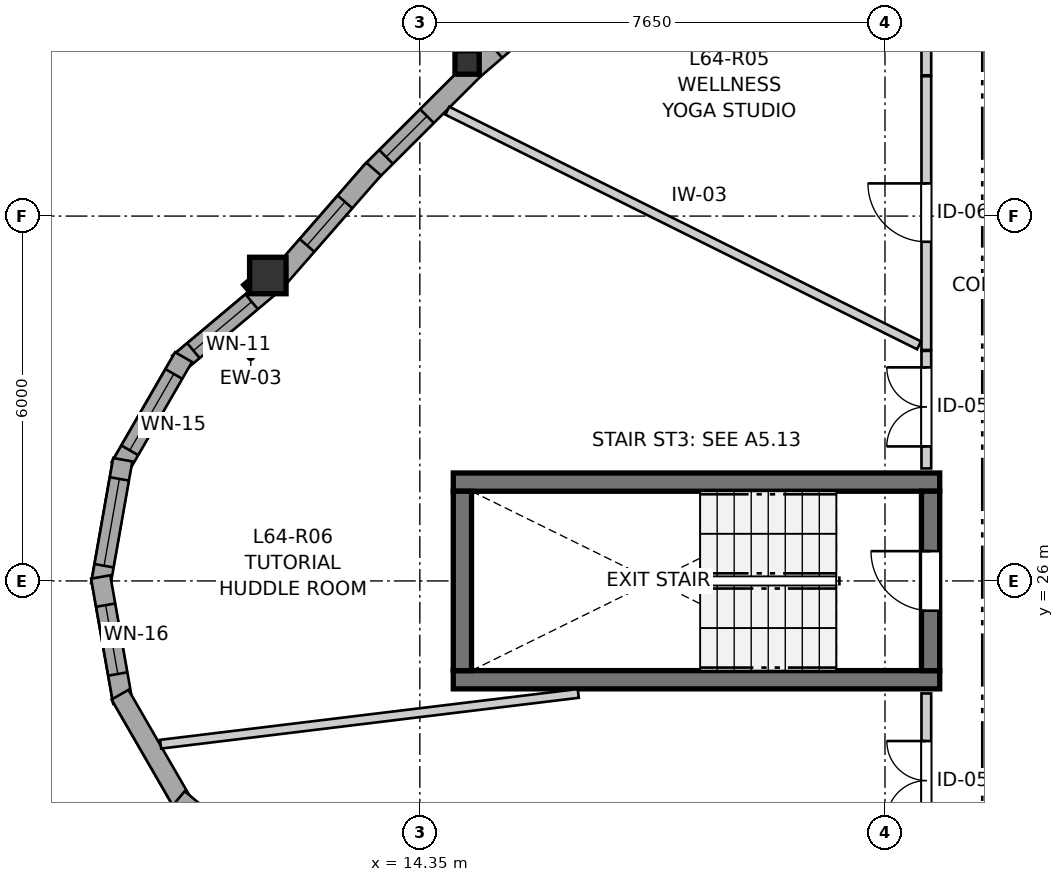
"""IFC4 building model, lengths in metres.
Left out: names, types, materials, properties, quantities, classifications, styles, units other than length and angle.
Written with IfcOpenShell. Run it as: python <this file> out.ifc"""

import sys

from ifc_helpers import new_model, si_unit, direction, frame, frame_2d, origin, origin_2d, place, context, subcontext, project, spatial, rectangle, i_section, extrude, source, transform, mapped, element, fill, save


model = new_model("IFC4")
c1 = context("Model", 3, precision=1e-05, world=origin(), true_north=direction((0.0, 1.0)))
c2 = subcontext(c1, "Body", "Model", "MODEL_VIEW")
j1 = project(units=[si_unit("LENGTHUNIT", "METRE"), si_unit("PLANEANGLEUNIT", "RADIAN")], contexts=[c1])
p1 = place(None, origin())
s1 = spatial("IfcSite", under=j1, at=p1, CompositionType="ELEMENT")
p2 = place(p1, origin())
s2 = spatial("IfcBuilding", under=s1, at=p2, CompositionType="ELEMENT")
p3 = place(p2, frame((0.0, 0.0, 214.8)))
s3 = spatial("IfcBuildingStorey", under=s2, at=p3, CompositionType="ELEMENT", Elevation=214.8)
for number, where, z_axis, x_axis in (
    (1, (14.9, 24.375, 0.0), (0.0, 0.0, 1.0), (1.0, 0.0, 0.0)),
    (2, (22.9, 27.625, 0.0), (0.0, 0.0, 1.0), (-1.0, 0.0, 0.0)),
):
    element("IfcWall", number, at=place(p3, frame(where, z_axis=z_axis, x_axis=x_axis)), inside=s3, PredefinedType="SHEAR", context=c2, shape_type="SweptSolid", body=[
        extrude(rectangle(XDim=8.0, YDim=0.3, at=frame_2d((4.0, 0.0))), origin(), (0.0, 0.0, 1.0), 2.96),
    ])
p4 = place(p3, frame((15.05, 27.475, 0.0), z_axis=(0.0, 0.0, 1.0), x_axis=(0.0, -1.0, 0.0)))
e3 = element("IfcWall", 3, at=p4, inside=s3, PredefinedType="SHEAR", context=c2, shape_type="SweptSolid", body=[
    extrude(rectangle(XDim=2.95, YDim=0.3, at=frame_2d((1.475, 0.0))), origin(), (0.0, 0.0, 1.0), 2.96),
])
p5 = place(p3, frame((22.75, 24.525, 0.0), z_axis=(0.0, 0.0, 1.0), x_axis=(0.0, 1.0, 0.0)))
e4 = element("IfcWall", 4, at=p5, inside=s3, PredefinedType="SHEAR", context=c2, shape_type="SweptSolid", body=[
    extrude(rectangle(XDim=2.95, YDim=0.3, at=frame_2d((1.475, 0.0))), origin(), (0.0, 0.0, 1.0), 2.96),
])
p6 = place(p5, frame((0.985, 0.0, 0.0)))
e5 = element("IfcOpeningElement", 5, at=p6, cuts=e4, PredefinedType="OPENING", context=c2, shape_type="SweptSolid", body=[
    extrude(rectangle(XDim=0.98, YDim=2.15, at=frame_2d((0.49, 1.075))), frame((0.0, 0.16, 0.0), z_axis=(0.0, -1.0, 0.0), x_axis=(1.0, 0.0, 0.0)), (0.0, 0.0, 1.0), 0.32),
])
m1 = source(origin(), c2, "Body", "SweptSolid", [
    extrude(rectangle(XDim=0.6, YDim=0.6, at=origin_2d()), origin(), (0.0, 0.0, 1.0), 2.96),
])
p7 = place(p3, frame((11.85, 31.023, 0.0), z_axis=(0.0, 0.0, 1.0), x_axis=(1.0, 0.0, 0.0)))
e6 = element("IfcColumn", 6, at=p7, inside=s3, PredefinedType="COLUMN", context=c2, shape_type="MappedRepresentation", body=[
    mapped(m1, transform((0.0, 0.0, 0.0), x_axis=(1.0, 0.0, 0.0), y_axis=(0.0, 1.0, 0.0), z_axis=(0.0, 0.0, 1.0), scale=1.0)),
])
m2 = source(origin(), c2, "Body", "SweptSolid", [
    extrude(i_section(OverallWidth=0.398, OverallDepth=0.387, WebThickness=0.019, FlangeThickness=0.03, FilletRadius=0.015, at=origin_2d()), origin(), (0.0, 0.0, 1.0), 2.96),
])
p8 = place(p3, frame((15.127, 34.526, 0.0), z_axis=(0.0, 0.0, 1.0), x_axis=(1.0, 0.0, 0.0)))
e7 = element("IfcColumn", 7, at=p8, inside=s3, PredefinedType="PILASTER", context=c2, shape_type="MappedRepresentation", body=[
    mapped(m2, transform((0.0, 0.0, 0.0), x_axis=(1.0, 0.0, 0.0), y_axis=(0.0, 1.0, 0.0), z_axis=(0.0, 0.0, 1.0), scale=1.0)),
])
p9 = place(p3, frame((8.912, 52.131, 0.0), z_axis=(0.0, 0.0, 1.0), x_axis=(0.500001129448, -0.866024751696, 0.0)))
e8 = element("IfcWall", 8, at=p9, inside=s3, PredefinedType="PARAPET", context=c2, shape_type="SweptSolid", body=[
    extrude(rectangle(XDim=20.349, YDim=0.26, at=frame_2d((10.175, 0.0))), origin(), (0.0, 0.0, 1.0), 0.55),
])
p10 = place(p3, frame((11.884, 30.843, 0.0), z_axis=(0.0, 0.0, 1.0), x_axis=(-0.76606505432, -0.642763045414, 0.0)))
e9 = element("IfcWall", 9, at=p10, inside=s3, PredefinedType="SOLIDWALL", context=c2, shape_type="SweptSolid", body=[
    extrude(rectangle(XDim=1.962, YDim=0.32, at=frame_2d((0.981, 0.0))), origin(), (0.0, 0.0, 1.0), 2.58),
])
p11 = place(p10, frame((0.391, 0.0, 0.82)))
e10 = element("IfcOpeningElement", 10, at=p11, cuts=e9, PredefinedType="OPENING", context=c2, shape_type="SweptSolid", body=[
    extrude(rectangle(XDim=1.25, YDim=1.35, at=frame_2d((0.625, 0.675))), frame((0.0, 0.17, 0.0), z_axis=(0.0, -1.0, 0.0), x_axis=(1.0, 0.0, 0.0)), (0.0, 0.0, 1.0), 0.34),
])
p12 = place(p3, frame((10.465, 29.681, 0.0), z_axis=(0.0, 0.0, 1.0), x_axis=(-0.499995423472, -0.866028046028, 0.0)))
e11 = element("IfcWall", 11, at=p12, inside=s3, PredefinedType="SOLIDWALL", context=c2, shape_type="SweptSolid", body=[
    extrude(rectangle(XDim=2.09, YDim=0.32, at=frame_2d((1.045, 0.0))), origin(), (0.0, 0.0, 1.0), 2.58),
])
p13 = place(p12, frame((0.32, 0.0, 0.82)))
e12 = element("IfcOpeningElement", 12, at=p13, cuts=e11, PredefinedType="OPENING", context=c2, shape_type="SweptSolid", body=[
    extrude(rectangle(XDim=1.45, YDim=1.25, at=frame_2d((0.725, 0.625))), frame((0.0, 0.17, 0.0), z_axis=(0.0, -1.0, 0.0), x_axis=(1.0, 0.0, 0.0)), (0.0, 0.0, 1.0), 0.34),
])
p14 = place(p3, frame((9.464, 27.993, 0.0), z_axis=(0.0, 0.0, 1.0), x_axis=(-0.173672066494, -0.984803540469, 0.0)))
e13 = element("IfcWall", 13, at=p14, inside=s3, PredefinedType="SOLIDWALL", context=c2, shape_type="SweptSolid", body=[
    extrude(rectangle(XDim=2.09, YDim=0.32, at=frame_2d((1.045, 0.0))), origin(), (0.0, 0.0, 1.0), 2.58),
])
p15 = place(p14, frame((0.32, 0.0, 0.82)))
e14 = element("IfcOpeningElement", 14, at=p15, cuts=e13, PredefinedType="OPENING", context=c2, shape_type="SweptSolid", body=[
    extrude(rectangle(XDim=1.45, YDim=1.25, at=frame_2d((0.725, 0.625))), frame((0.0, 0.17, 0.0), z_axis=(0.0, -1.0, 0.0), x_axis=(1.0, 0.0, 0.0)), (0.0, 0.0, 1.0), 0.34),
])
p16 = place(p3, frame((9.101, 26.065, 0.0), z_axis=(0.0, 0.0, 1.0), x_axis=(0.173672066494, -0.984803540469, 0.0)))
e15 = element("IfcWall", 15, at=p16, inside=s3, PredefinedType="SOLIDWALL", context=c2, shape_type="SweptSolid", body=[
    extrude(rectangle(XDim=2.09, YDim=0.32, at=frame_2d((1.045, 0.0))), origin(), (0.0, 0.0, 1.0), 2.58),
])
p17 = place(p16, frame((0.47, 0.0, 0.82)))
e16 = element("IfcOpeningElement", 16, at=p17, cuts=e15, PredefinedType="OPENING", context=c2, shape_type="SweptSolid", body=[
    extrude(rectangle(XDim=1.15, YDim=1.2, at=frame_2d((0.575, 0.6))), frame((0.0, 0.17, 0.0), z_axis=(0.0, -1.0, 0.0), x_axis=(1.0, 0.0, 0.0)), (0.0, 0.0, 1.0), 0.34),
])
p18 = place(p3, frame((9.419, 24.129, 0.0), z_axis=(0.0, 0.0, 1.0), x_axis=(0.499995423472, -0.866028046028, 0.0)))
e17 = element("IfcWall", 17, at=p18, inside=s3, PredefinedType="SOLIDWALL", context=c2, shape_type="SweptSolid", body=[
    extrude(rectangle(XDim=2.09, YDim=0.32, at=frame_2d((1.045, 0.0))), origin(), (0.0, 0.0, 1.0), 2.58),
])
p19 = place(p3, frame((10.381, 22.419, 0.0), z_axis=(0.0, 0.0, 1.0), x_axis=(0.766099948115, -0.642721455608, 0.0)))
e18 = element("IfcWall", 18, at=p19, inside=s3, PredefinedType="SOLIDWALL", context=c2, shape_type="SweptSolid", body=[
    extrude(rectangle(XDim=2.032, YDim=0.32, at=frame_2d((1.016, 0.0))), origin(), (0.0, 0.0, 1.0), 2.58),
])
p20 = place(p19, frame((0.261, 0.0, 0.82)))
e19 = element("IfcOpeningElement", 19, at=p20, cuts=e18, PredefinedType="OPENING", context=c2, shape_type="SweptSolid", body=[
    extrude(rectangle(XDim=1.45, YDim=1.25, at=frame_2d((0.725, 0.625))), frame((0.0, 0.17, 0.0), z_axis=(0.0, -1.0, 0.0), x_axis=(1.0, 0.0, 0.0)), (0.0, 0.0, 1.0), 0.34),
])
p21 = place(p3, frame((17.03, 35.955, 0.0), z_axis=(0.0, 0.0, 1.0), x_axis=(-0.757489541562, -0.652847297937, 0.0)))
e20 = element("IfcWall", 20, at=p21, inside=s3, PredefinedType="SOLIDWALL", context=c2, shape_type="SweptSolid", body=[
    extrude(rectangle(XDim=2.354, YDim=0.32, at=frame_2d((1.177, 0.0))), origin(), (0.0, 0.0, 1.0), 2.58),
])
p22 = place(p21, frame((0.487, 0.0, 0.82)))
e21 = element("IfcOpeningElement", 21, at=p22, cuts=e20, PredefinedType="OPENING", context=c2, shape_type="SweptSolid", body=[
    extrude(rectangle(XDim=1.4, YDim=1.35, at=frame_2d((0.7, 0.675))), frame((0.0, 0.17, 0.0), z_axis=(0.0, -1.0, 0.0), x_axis=(1.0, 0.0, 0.0)), (0.0, 0.0, 1.0), 0.34),
])
p23 = place(p3, frame((15.226, 34.399, 0.0), z_axis=(0.0, 0.0, 1.0), x_axis=(-0.708431997636, -0.705779076429, 0.0)))
e22 = element("IfcWall", 22, at=p23, inside=s3, PredefinedType="SOLIDWALL", context=c2, shape_type="SweptSolid", body=[
    extrude(rectangle(XDim=2.393, YDim=0.32, at=frame_2d((1.196, 0.0))), origin(), (0.0, 0.0, 1.0), 2.58),
])
p24 = place(p23, frame((1.07, 0.0, 0.82)))
e23 = element("IfcOpeningElement", 23, at=p24, cuts=e22, PredefinedType="OPENING", context=c2, shape_type="SweptSolid", body=[
    extrude(rectangle(XDim=0.95, YDim=1.35, at=frame_2d((0.475, 0.675))), frame((0.0, 0.17, 0.0), z_axis=(0.0, -1.0, 0.0), x_axis=(1.0, 0.0, 0.0)), (0.0, 0.0, 1.0), 0.34),
])
p25 = place(p3, frame((13.591, 32.774, 0.0), z_axis=(0.0, 0.0, 1.0), x_axis=(-0.657601126926, -0.753366283999, 0.0)))
e24 = element("IfcWall", 24, at=p25, inside=s3, PredefinedType="SOLIDWALL", context=c2, shape_type="SweptSolid", body=[
    extrude(rectangle(XDim=2.374, YDim=0.32, at=frame_2d((1.187, 0.0))), origin(), (0.0, 0.0, 1.0), 2.58),
])
p26 = place(p25, frame((0.717, 0.0, 0.82)))
e25 = element("IfcOpeningElement", 25, at=p26, cuts=e24, PredefinedType="OPENING", context=c2, shape_type="SweptSolid", body=[
    extrude(rectangle(XDim=0.95, YDim=1.35, at=frame_2d((0.475, 0.675))), frame((0.0, 0.17, 0.0), z_axis=(0.0, -1.0, 0.0), x_axis=(1.0, 0.0, 0.0)), (0.0, 0.0, 1.0), 0.34),
])
p27 = place(p3, frame((22.68, 29.798, 0.0), z_axis=(0.0, 0.0, 1.0), x_axis=(0.0, 1.0, 0.0)))
e26 = element("IfcWall", 26, at=p27, inside=s3, PredefinedType="PARTITIONING", context=c2, shape_type="SweptSolid", body=[
    extrude(rectangle(XDim=4.502, YDim=0.16, at=frame_2d((2.251, 0.0))), origin(), (0.0, 0.0, 1.0), 2.96),
])
p28 = place(p27, frame((1.78, 0.0, 0.0)))
e27 = element("IfcOpeningElement", 27, at=p28, cuts=e26, PredefinedType="OPENING", context=c2, shape_type="SweptSolid", body=[
    extrude(rectangle(XDim=0.96, YDim=2.1, at=frame_2d((0.48, 1.05))), frame((0.0, 0.09, 0.0), z_axis=(0.0, -1.0, 0.0), x_axis=(1.0, 0.0, 0.0)), (0.0, 0.0, 1.0), 0.18),
])
p29 = place(p3, frame((22.68, 21.241, 0.0), z_axis=(0.0, 0.0, 1.0), x_axis=(0.0, 1.0, 0.0)))
e28 = element("IfcWall", 28, at=p29, inside=s3, PredefinedType="PARTITIONING", context=c2, shape_type="SweptSolid", body=[
    extrude(rectangle(XDim=2.909, YDim=0.16, at=frame_2d((1.455, 0.0))), origin(), (0.0, 0.0, 1.0), 2.96),
])
p30 = place(p29, frame((0.826, 0.0, 0.0)))
e29 = element("IfcOpeningElement", 29, at=p30, cuts=e28, PredefinedType="OPENING", context=c2, shape_type="SweptSolid", body=[
    extrude(rectangle(XDim=1.3, YDim=2.1, at=frame_2d((0.65, 1.05))), frame((0.0, 0.09, 0.0), z_axis=(0.0, -1.0, 0.0), x_axis=(1.0, 0.0, 0.0)), (0.0, 0.0, 1.0), 0.18),
])
p31 = place(p3, frame((22.68, 27.85, 0.0), z_axis=(0.0, 0.0, 1.0), x_axis=(0.0, 1.0, 0.0)))
e30 = element("IfcWall", 30, at=p31, inside=s3, PredefinedType="PARTITIONING", context=c2, shape_type="SweptSolid", body=[
    extrude(rectangle(XDim=1.933, YDim=0.16, at=frame_2d((0.966, 0.0))), origin(), (0.0, 0.0, 1.0), 2.96),
])
p32 = place(p31, frame((0.362, 0.0, 0.0)))
e31 = element("IfcOpeningElement", 31, at=p32, cuts=e30, PredefinedType="OPENING", context=c2, shape_type="SweptSolid", body=[
    extrude(rectangle(XDim=1.3, YDim=2.1, at=frame_2d((0.65, 1.05))), frame((0.0, 0.09, 0.0), z_axis=(0.0, -1.0, 0.0), x_axis=(1.0, 0.0, 0.0)), (0.0, 0.0, 1.0), 0.18),
])
p33 = place(p3, frame((14.802, 33.734, 0.0), z_axis=(0.0, 0.0, 1.0), x_axis=(0.895354955696, -0.445353234311, 0.0)))
e32 = element("IfcWall", 32, at=p33, inside=s3, PredefinedType="PARTITIONING", context=c2, shape_type="SweptSolid", body=[
    extrude(rectangle(XDim=8.666, YDim=0.145, at=frame_2d((4.333, 0.0))), origin(), (0.0, 0.0, 1.0), 2.96),
])
p34 = place(p3, frame((10.087, 23.315, 0.0), z_axis=(0.0, 0.0, 1.0), x_axis=(0.992692853732, 0.120668546642, 0.0)))
e33 = element("IfcWall", 33, at=p34, inside=s3, PredefinedType="PARTITIONING", context=c2, shape_type="SweptSolid", body=[
    extrude(rectangle(XDim=6.919, YDim=0.145, at=frame_2d((3.46, 0.0))), origin(), (0.0, 0.0, 1.0), 2.96),
])
p35 = place(p3, frame((22.68, 34.315, 0.0), z_axis=(0.0, 0.0, 1.0), x_axis=(0.0, 1.0, 0.0)))
e34 = element("IfcWall", 34, at=p35, inside=s3, PredefinedType="PARTITIONING", context=c2, shape_type="SweptSolid", body=[
    extrude(rectangle(XDim=0.707, YDim=0.16, at=frame_2d((0.353, 0.0))), origin(), (0.0, 0.0, 1.0), 2.96),
])
m3 = source(origin(), c2, "Body", "SweptSolid", [
    extrude(rectangle(XDim=1.25, YDim=1.35, at=frame_2d((0.625, 0.675))), frame((0.0, 0.03, 0.0), z_axis=(0.0, -1.0, 0.0), x_axis=(1.0, 0.0, 0.0)), (0.0, 0.0, 1.0), 0.06),
])
p36 = place(p11, origin())
e35 = element("IfcWindow", 35, at=p36, inside=s3, PartitioningType="SINGLE_PANEL", PredefinedType="WINDOW", context=c2, shape_type="MappedRepresentation", body=[
    mapped(m3, transform((0.0, 0.0, 0.0), x_axis=(1.0, 0.0, 0.0), y_axis=(0.0, 1.0, 0.0), z_axis=(0.0, 0.0, 1.0), scale=1.0)),
])
fill(e10, e35)
m4 = source(origin(), c2, "Body", "SweptSolid", [
    extrude(rectangle(XDim=1.45, YDim=1.25, at=frame_2d((0.725, 0.625))), frame((0.0, 0.03, 0.0), z_axis=(0.0, -1.0, 0.0), x_axis=(1.0, 0.0, 0.0)), (0.0, 0.0, 1.0), 0.06),
])
p37 = place(p13, origin())
e36 = element("IfcWindow", 36, at=p37, inside=s3, PartitioningType="SINGLE_PANEL", PredefinedType="WINDOW", context=c2, shape_type="MappedRepresentation", body=[
    mapped(m4, transform((0.0, 0.0, 0.0), x_axis=(1.0, 0.0, 0.0), y_axis=(0.0, 1.0, 0.0), z_axis=(0.0, 0.0, 1.0), scale=1.0)),
])
fill(e12, e36)
p38 = place(p15, origin())
e37 = element("IfcWindow", 37, at=p38, inside=s3, PartitioningType="SINGLE_PANEL", PredefinedType="WINDOW", context=c2, shape_type="MappedRepresentation", body=[
    mapped(m4, transform((0.0, 0.0, 0.0), x_axis=(1.0, 0.0, 0.0), y_axis=(0.0, 1.0, 0.0), z_axis=(0.0, 0.0, 1.0), scale=1.0)),
])
fill(e14, e37)
m5 = source(origin(), c2, "Body", "SweptSolid", [
    extrude(rectangle(XDim=1.15, YDim=1.2, at=frame_2d((0.575, 0.6))), frame((0.0, 0.03, 0.0), z_axis=(0.0, -1.0, 0.0), x_axis=(1.0, 0.0, 0.0)), (0.0, 0.0, 1.0), 0.06),
])
p39 = place(p17, origin())
e38 = element("IfcWindow", 38, at=p39, inside=s3, PartitioningType="SINGLE_PANEL", PredefinedType="WINDOW", context=c2, shape_type="MappedRepresentation", body=[
    mapped(m5, transform((0.0, 0.0, 0.0), x_axis=(1.0, 0.0, 0.0), y_axis=(0.0, 1.0, 0.0), z_axis=(0.0, 0.0, 1.0), scale=1.0)),
])
fill(e16, e38)
m6 = source(origin(), c2, "Body", "SweptSolid", [
    extrude(rectangle(XDim=0.95, YDim=1.35, at=frame_2d((0.475, 0.675))), frame((0.0, 0.03, 0.0), z_axis=(0.0, -1.0, 0.0), x_axis=(1.0, 0.0, 0.0)), (0.0, 0.0, 1.0), 0.06),
])
p40 = place(p24, origin())
e39 = element("IfcWindow", 39, at=p40, inside=s3, PartitioningType="SINGLE_PANEL", PredefinedType="WINDOW", context=c2, shape_type="MappedRepresentation", body=[
    mapped(m6, transform((0.0, 0.0, 0.0), x_axis=(1.0, 0.0, 0.0), y_axis=(0.0, 1.0, 0.0), z_axis=(0.0, 0.0, 1.0), scale=1.0)),
])
fill(e23, e39)
p41 = place(p26, origin())
e40 = element("IfcWindow", 40, at=p41, inside=s3, PartitioningType="SINGLE_PANEL", PredefinedType="WINDOW", context=c2, shape_type="MappedRepresentation", body=[
    mapped(m6, transform((0.0, 0.0, 0.0), x_axis=(1.0, 0.0, 0.0), y_axis=(0.0, 1.0, 0.0), z_axis=(0.0, 0.0, 1.0), scale=1.0)),
])
fill(e25, e40)
m7 = source(origin(), c2, "Body", "SweptSolid", [
    extrude(rectangle(XDim=0.98, YDim=2.15, at=frame_2d((0.49, 1.075))), frame((0.0, 0.025, 0.0), z_axis=(0.0, -1.0, 0.0), x_axis=(1.0, 0.0, 0.0)), (0.0, 0.0, 1.0), 0.05),
])
p42 = place(p6, origin())
e41 = element("IfcDoor", 41, at=p42, inside=s3, OperationType="SINGLE_SWING_RIGHT", PredefinedType="DOOR", context=c2, shape_type="MappedRepresentation", body=[
    mapped(m7, transform((0.0, 0.0, 0.0), x_axis=(1.0, 0.0, 0.0), y_axis=(0.0, 1.0, 0.0), z_axis=(0.0, 0.0, 1.0), scale=1.0)),
])
fill(e5, e41)
m8 = source(origin(), c2, "Body", "SweptSolid", [
    extrude(rectangle(XDim=0.96, YDim=2.1, at=frame_2d((0.48, 1.05))), frame((0.0, 0.025, 0.0), z_axis=(0.0, -1.0, 0.0), x_axis=(1.0, 0.0, 0.0)), (0.0, 0.0, 1.0), 0.05),
])
p43 = place(p28, origin())
e42 = element("IfcDoor", 42, at=p43, inside=s3, OperationType="SINGLE_SWING_RIGHT", PredefinedType="DOOR", context=c2, shape_type="MappedRepresentation", body=[
    mapped(m8, transform((0.0, 0.0, 0.0), x_axis=(1.0, 0.0, 0.0), y_axis=(0.0, 1.0, 0.0), z_axis=(0.0, 0.0, 1.0), scale=1.0)),
])
fill(e27, e42)
m9 = source(origin(), c2, "Body", "SweptSolid", [
    extrude(rectangle(XDim=1.3, YDim=2.1, at=frame_2d((0.65, 1.05))), frame((0.0, 0.025, 0.0), z_axis=(0.0, -1.0, 0.0), x_axis=(1.0, 0.0, 0.0)), (0.0, 0.0, 1.0), 0.05),
])
p44 = place(p30, origin())
e43 = element("IfcDoor", 43, at=p44, inside=s3, OperationType="DOUBLE_DOOR_SINGLE_SWING", PredefinedType="DOOR", context=c2, shape_type="MappedRepresentation", body=[
    mapped(m9, transform((0.0, 0.0, 0.0), x_axis=(1.0, 0.0, 0.0), y_axis=(0.0, 1.0, 0.0), z_axis=(0.0, 0.0, 1.0), scale=1.0)),
])
fill(e29, e43)
p45 = place(p32, origin())
e44 = element("IfcDoor", 44, at=p45, inside=s3, OperationType="DOUBLE_DOOR_SINGLE_SWING", PredefinedType="DOOR", context=c2, shape_type="MappedRepresentation", body=[
    mapped(m9, transform((0.0, 0.0, 0.0), x_axis=(1.0, 0.0, 0.0), y_axis=(0.0, 1.0, 0.0), z_axis=(0.0, 0.0, 1.0), scale=1.0)),
])
fill(e31, e44)
save(model, sys.argv[1])
